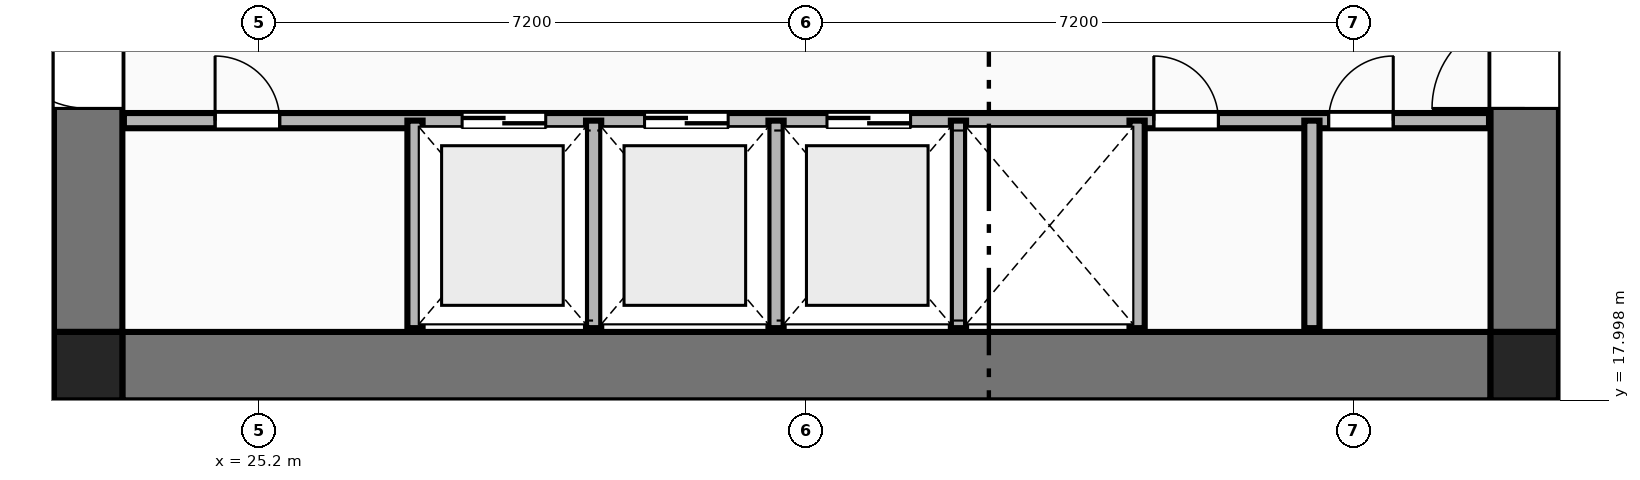
"""IFC4 building model, lengths in metres.
Left out: names, types, materials, properties, quantities, classifications, styles, units other than length and angle.
Written with IfcOpenShell. Run it as: python <this file> out.ifc"""

import sys

from ifc_helpers import new_model, si_unit, direction, frame, frame_2d, origin, origin_2d, place, context, subcontext, project, spatial, rectangle, extrude, element, fill, save


model = new_model("IFC4")
c1 = context("Model", 3, precision=1e-05, world=origin(), true_north=direction((0.0, 1.0)))
c2 = subcontext(c1, "Body", "Model", "MODEL_VIEW")
j1 = project(units=[si_unit("LENGTHUNIT", "METRE"), si_unit("PLANEANGLEUNIT", "RADIAN")], contexts=[c1])
p1 = place(None, origin())
s1 = spatial("IfcSite", under=j1, at=p1, CompositionType="ELEMENT")
p2 = place(p1, origin())
s2 = spatial("IfcBuilding", under=s1, at=p2, CompositionType="ELEMENT")
p3 = place(p2, frame((0.0, 0.0, 71.05)))
s3 = spatial("IfcBuildingStorey", under=s2, at=p3, CompositionType="ELEMENT", Elevation=71.05)
for number, where, z_axis, x_axis in (
    (1, (22.95, 18.45, 0.0), (0.0, 0.0, 1.0), (1.0, 0.0, 0.0)),
    (2, (41.85, 18.45, 0.0), (0.0, 0.0, 1.0), (1.0, 0.0, 0.0)),
):
    element("IfcColumn", number, at=place(p3, frame(where, z_axis=z_axis, x_axis=x_axis)), inside=s3, PredefinedType="COLUMN", context=c2, shape_type="SweptSolid", body=[
        extrude(rectangle(XDim=0.9, YDim=0.9, at=origin_2d()), origin(), (0.0, 0.0, 1.0), 3.55),
    ])
p4 = place(p3, frame((23.4, 18.45, 0.0), z_axis=(0.0, 0.0, 1.0), x_axis=(1.0, 0.0, 0.0)))
e3 = element("IfcWall", 3, at=p4, inside=s3, PredefinedType="SHEAR", context=c2, shape_type="SweptSolid", body=[
    extrude(rectangle(XDim=18.0, YDim=0.9, at=frame_2d((9.0, 0.0))), origin(), (0.0, 0.0, 1.0), 3.27),
])
p5 = place(p3, frame((22.95, 18.9, 0.0), z_axis=(0.0, 0.0, 1.0), x_axis=(0.0, 1.0, 0.0)))
e4 = element("IfcWall", 4, at=p5, inside=s3, PredefinedType="SHEAR", context=c2, shape_type="SweptSolid", body=[
    extrude(rectangle(XDim=14.0, YDim=0.9, at=frame_2d((7.0, 0.0))), origin(), (0.0, 0.0, 1.0), 3.27),
])
p6 = place(p5, frame((2.94, 0.0, 0.0)))
e5 = element("IfcOpeningElement", 5, at=p6, cuts=e4, PredefinedType="OPENING", context=c2, shape_type="SweptSolid", body=[
    extrude(rectangle(XDim=1.22, YDim=2.25, at=frame_2d((0.61, 1.125))), frame((0.0, 0.46, 0.0), z_axis=(0.0, -1.0, 0.0), x_axis=(1.0, 0.0, 0.0)), (0.0, 0.0, 1.0), 0.92),
])
p7 = place(p3, frame((41.85, 18.9, 0.0), z_axis=(0.0, 0.0, 1.0), x_axis=(0.0, 1.0, 0.0)))
e6 = element("IfcWall", 6, at=p7, inside=s3, PredefinedType="SHEAR", context=c2, shape_type="SweptSolid", body=[
    extrude(rectangle(XDim=14.0, YDim=0.9, at=frame_2d((7.0, 0.0))), origin(), (0.0, 0.0, 1.0), 3.27),
])
p8 = place(p7, frame((2.94, 0.0, 0.0)))
e7 = element("IfcOpeningElement", 7, at=p8, cuts=e6, PredefinedType="OPENING", context=c2, shape_type="SweptSolid", body=[
    extrude(rectangle(XDim=1.22, YDim=2.25, at=frame_2d((0.61, 1.125))), frame((0.0, 0.46, 0.0), z_axis=(0.0, -1.0, 0.0), x_axis=(1.0, 0.0, 0.0)), (0.0, 0.0, 1.0), 0.92),
])
p9 = place(p3, frame((23.42, 21.68, 0.0), z_axis=(0.0, 0.0, 1.0), x_axis=(1.0, 0.0, 0.0)))
e8 = element("IfcWall", 8, at=p9, inside=s3, PredefinedType="PLUMBINGWALL", context=c2, shape_type="SweptSolid", body=[
    extrude(rectangle(XDim=17.96, YDim=0.2, at=frame_2d((8.98, 0.0))), origin(), (0.0, 0.0, 1.0), 3.27),
])
p10 = place(p9, frame((4.45, 0.0, 0.0)))
e9 = element("IfcOpeningElement", 9, at=p10, cuts=e8, PredefinedType="OPENING", context=c2, shape_type="SweptSolid", body=[
    extrude(rectangle(XDim=1.1, YDim=2.2, at=frame_2d((0.55, 1.1))), frame((0.0, 0.11, 0.0), z_axis=(0.0, -1.0, 0.0), x_axis=(1.0, 0.0, 0.0)), (0.0, 0.0, 1.0), 0.22),
])
p11 = place(p9, frame((6.85, 0.0, 0.0)))
e10 = element("IfcOpeningElement", 10, at=p11, cuts=e8, PredefinedType="OPENING", context=c2, shape_type="SweptSolid", body=[
    extrude(rectangle(XDim=1.1, YDim=2.2, at=frame_2d((0.55, 1.1))), frame((0.0, 0.11, 0.0), z_axis=(0.0, -1.0, 0.0), x_axis=(1.0, 0.0, 0.0)), (0.0, 0.0, 1.0), 0.22),
])
p12 = place(p9, frame((9.25, 0.0, 0.0)))
e11 = element("IfcOpeningElement", 11, at=p12, cuts=e8, PredefinedType="OPENING", context=c2, shape_type="SweptSolid", body=[
    extrude(rectangle(XDim=1.1, YDim=2.2, at=frame_2d((0.55, 1.1))), frame((0.0, 0.11, 0.0), z_axis=(0.0, -1.0, 0.0), x_axis=(1.0, 0.0, 0.0)), (0.0, 0.0, 1.0), 0.22),
])
p13 = place(p9, frame((1.2, 0.0, 0.0)))
e12 = element("IfcOpeningElement", 12, at=p13, cuts=e8, PredefinedType="OPENING", context=c2, shape_type="SweptSolid", body=[
    extrude(rectangle(XDim=0.85, YDim=2.05, at=frame_2d((0.425, 1.025))), frame((0.0, 0.11, 0.0), z_axis=(0.0, -1.0, 0.0), x_axis=(1.0, 0.0, 0.0)), (0.0, 0.0, 1.0), 0.22),
])
p14 = place(p9, frame((13.55, 0.0, 0.0)))
e13 = element("IfcOpeningElement", 13, at=p14, cuts=e8, PredefinedType="OPENING", context=c2, shape_type="SweptSolid", body=[
    extrude(rectangle(XDim=0.85, YDim=2.05, at=frame_2d((0.425, 1.025))), frame((0.0, 0.11, 0.0), z_axis=(0.0, -1.0, 0.0), x_axis=(1.0, 0.0, 0.0)), (0.0, 0.0, 1.0), 0.22),
])
p15 = place(p9, frame((15.85, 0.0, 0.0)))
e14 = element("IfcOpeningElement", 14, at=p15, cuts=e8, PredefinedType="OPENING", context=c2, shape_type="SweptSolid", body=[
    extrude(rectangle(XDim=0.85, YDim=2.05, at=frame_2d((0.425, 1.025))), frame((0.0, 0.11, 0.0), z_axis=(0.0, -1.0, 0.0), x_axis=(1.0, 0.0, 0.0)), (0.0, 0.0, 1.0), 0.22),
])
for number, where, z_axis, x_axis in (
    (15, (27.25, 18.95, 0.0), (0.0, 0.0, 1.0), (0.0, 1.0, 0.0)),
    (16, (29.6, 18.95, 0.0), (0.0, 0.0, 1.0), (0.0, 1.0, 0.0)),
    (17, (32.0, 18.95, 0.0), (0.0, 0.0, 1.0), (0.0, 1.0, 0.0)),
    (18, (34.4, 18.95, 0.0), (0.0, 0.0, 1.0), (0.0, 1.0, 0.0)),
    (19, (36.75, 18.95, 0.0), (0.0, 0.0, 1.0), (0.0, 1.0, 0.0)),
    (20, (39.05, 18.95, 0.0), (0.0, 0.0, 1.0), (0.0, 1.0, 0.0)),
):
    element("IfcWall", number, at=place(p3, frame(where, z_axis=z_axis, x_axis=x_axis)), inside=s3, PredefinedType="PLUMBINGWALL", context=c2, shape_type="SweptSolid", body=[
        extrude(rectangle(XDim=2.73, YDim=0.2, at=frame_2d((1.365, 0.0))), origin(), (0.0, 0.0, 1.0), 3.27),
    ])
p16 = place(p6, origin())
e21 = element("IfcDoor", 21, at=p16, inside=s3, OperationType="SINGLE_SWING_RIGHT", PredefinedType="DOOR", context=c2, shape_type="SweptSolid", body=[
    extrude(rectangle(XDim=1.22, YDim=2.25, at=frame_2d((0.61, 1.125))), frame((0.0, 0.025, 0.0), z_axis=(0.0, -1.0, 0.0), x_axis=(1.0, 0.0, 0.0)), (0.0, 0.0, 1.0), 0.05),
])
fill(e5, e21)
p17 = place(p8, origin())
e22 = element("IfcDoor", 22, at=p17, inside=s3, OperationType="SINGLE_SWING_LEFT", PredefinedType="DOOR", context=c2, shape_type="SweptSolid", body=[
    extrude(rectangle(XDim=1.22, YDim=2.25, at=frame_2d((0.61, 1.125))), frame((0.0, 0.025, 0.0), z_axis=(0.0, -1.0, 0.0), x_axis=(1.0, 0.0, 0.0)), (0.0, 0.0, 1.0), 0.05),
])
fill(e7, e22)
p18 = place(p10, origin())
e23 = element("IfcDoor", 23, at=p18, inside=s3, OperationType="DOUBLE_DOOR_SLIDING", PredefinedType="DOOR", context=c2, shape_type="SweptSolid", body=[
    extrude(rectangle(XDim=1.1, YDim=2.2, at=frame_2d((0.55, 1.1))), frame((0.0, 0.025, 0.0), z_axis=(0.0, -1.0, 0.0), x_axis=(1.0, 0.0, 0.0)), (0.0, 0.0, 1.0), 0.05),
])
fill(e9, e23)
p19 = place(p11, origin())
e24 = element("IfcDoor", 24, at=p19, inside=s3, OperationType="DOUBLE_DOOR_SLIDING", PredefinedType="DOOR", context=c2, shape_type="SweptSolid", body=[
    extrude(rectangle(XDim=1.1, YDim=2.2, at=frame_2d((0.55, 1.1))), frame((0.0, 0.025, 0.0), z_axis=(0.0, -1.0, 0.0), x_axis=(1.0, 0.0, 0.0)), (0.0, 0.0, 1.0), 0.05),
])
fill(e10, e24)
p20 = place(p12, origin())
e25 = element("IfcDoor", 25, at=p20, inside=s3, OperationType="DOUBLE_DOOR_SLIDING", PredefinedType="DOOR", context=c2, shape_type="SweptSolid", body=[
    extrude(rectangle(XDim=1.1, YDim=2.2, at=frame_2d((0.55, 1.1))), frame((0.0, 0.025, 0.0), z_axis=(0.0, -1.0, 0.0), x_axis=(1.0, 0.0, 0.0)), (0.0, 0.0, 1.0), 0.05),
])
fill(e11, e25)
p21 = place(p13, origin())
e26 = element("IfcDoor", 26, at=p21, inside=s3, OperationType="SINGLE_SWING_LEFT", PredefinedType="DOOR", context=c2, shape_type="SweptSolid", body=[
    extrude(rectangle(XDim=0.85, YDim=2.05, at=frame_2d((0.425, 1.025))), frame((0.0, 0.025, 0.0), z_axis=(0.0, -1.0, 0.0), x_axis=(1.0, 0.0, 0.0)), (0.0, 0.0, 1.0), 0.05),
])
fill(e12, e26)
p22 = place(p14, origin())
e27 = element("IfcDoor", 27, at=p22, inside=s3, OperationType="SINGLE_SWING_LEFT", PredefinedType="DOOR", context=c2, shape_type="SweptSolid", body=[
    extrude(rectangle(XDim=0.85, YDim=2.05, at=frame_2d((0.425, 1.025))), frame((0.0, 0.025, 0.0), z_axis=(0.0, -1.0, 0.0), x_axis=(1.0, 0.0, 0.0)), (0.0, 0.0, 1.0), 0.05),
])
fill(e13, e27)
p23 = place(p15, origin())
e28 = element("IfcDoor", 28, at=p23, inside=s3, OperationType="SINGLE_SWING_RIGHT", PredefinedType="DOOR", context=c2, shape_type="SweptSolid", body=[
    extrude(rectangle(XDim=0.85, YDim=2.05, at=frame_2d((0.425, 1.025))), frame((0.0, 0.025, 0.0), z_axis=(0.0, -1.0, 0.0), x_axis=(1.0, 0.0, 0.0)), (0.0, 0.0, 1.0), 0.05),
])
fill(e14, e28)
save(model, sys.argv[1])
